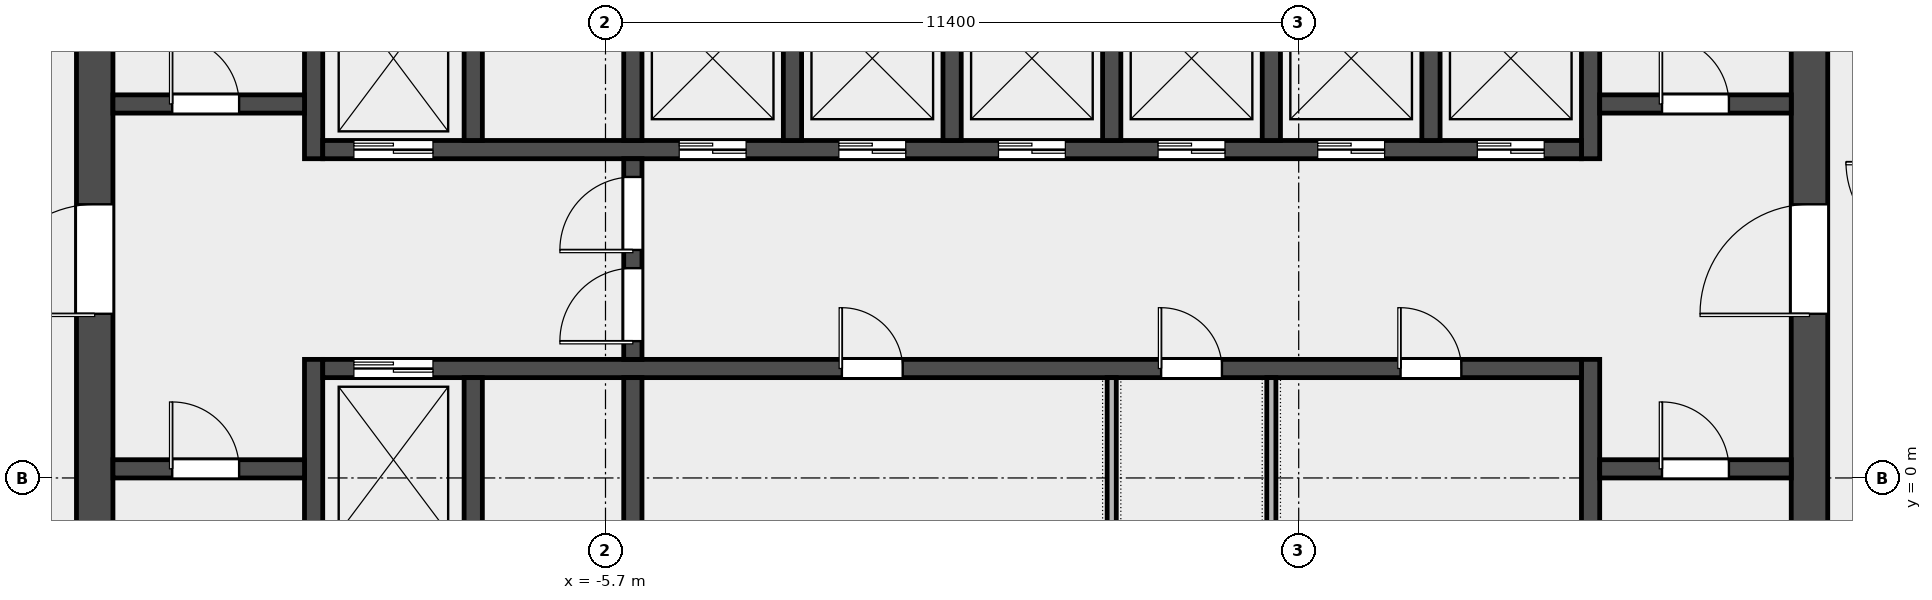
"""IFC4 building model, lengths in metres.
Left out: names, types, materials, properties, quantities, classifications, styles, units other than length and angle.
Written with IfcOpenShell. Run it as: python <this file> out.ifc"""

import sys

from ifc_helpers import new_model, si_unit, direction, frame, frame_2d, origin, place, context, subcontext, project, spatial, rectangle, extrude, element, fill, save


model = new_model("IFC4")
c1 = context("Model", 3, precision=1e-05, world=origin(), true_north=direction((0.0, 1.0)))
c2 = subcontext(c1, "Body", "Model", "MODEL_VIEW")
j1 = project(units=[si_unit("LENGTHUNIT", "METRE"), si_unit("PLANEANGLEUNIT", "RADIAN")], contexts=[c1])
p1 = place(None, origin())
s1 = spatial("IfcSite", under=j1, at=p1, CompositionType="ELEMENT")
p2 = place(p1, origin())
s2 = spatial("IfcBuilding", under=s1, at=p2, CompositionType="ELEMENT")
p3 = place(p2, frame((0.0, 0.0, 291.4)))
s3 = spatial("IfcBuildingStorey", under=s2, at=p3, CompositionType="ELEMENT", Elevation=291.4)
p4 = place(p3, frame((-14.1, -6.6, 0.0), z_axis=(0.0, 0.0, 1.0), x_axis=(0.0, 1.0, 0.0)))
e1 = element("IfcWall", 1, at=p4, inside=s3, PredefinedType="SHEAR", context=c2, shape_type="SweptSolid", body=[
    extrude(rectangle(XDim=19.5, YDim=0.6, at=frame_2d((9.75, 0.0))), origin(), (0.0, 0.0, 1.0), 3.7),
])
p5 = place(p4, frame((9.3, 0.0, 0.0)))
e2 = element("IfcOpeningElement", 2, at=p5, cuts=e1, PredefinedType="OPENING", context=c2, shape_type="SweptSolid", body=[
    extrude(rectangle(XDim=1.8, YDim=2.1, at=frame_2d((0.9, 1.05))), frame((0.0, 0.312, 0.0), z_axis=(0.0, -1.0, 0.0), x_axis=(1.0, 0.0, 0.0)), (0.0, 0.0, 1.0), 0.624),
])
p6 = place(p3, frame((14.1, -6.6, 0.0), z_axis=(0.0, 0.0, 1.0), x_axis=(0.0, 1.0, 0.0)))
e3 = element("IfcWall", 3, at=p6, inside=s3, PredefinedType="SHEAR", context=c2, shape_type="SweptSolid", body=[
    extrude(rectangle(XDim=19.5, YDim=0.6, at=frame_2d((9.75, 0.0))), origin(), (0.0, 0.0, 1.0), 3.7),
])
p7 = place(p6, frame((9.3, 0.0, 0.0)))
e4 = element("IfcOpeningElement", 4, at=p7, cuts=e3, PredefinedType="OPENING", context=c2, shape_type="SweptSolid", body=[
    extrude(rectangle(XDim=1.8, YDim=2.1, at=frame_2d((0.9, 1.05))), frame((0.0, 0.312, 0.0), z_axis=(0.0, -1.0, 0.0), x_axis=(1.0, 0.0, 0.0)), (0.0, 0.0, 1.0), 0.624),
])
p8 = place(p3, frame((-10.5, -6.6, 0.0), z_axis=(0.0, 0.0, 1.0), x_axis=(0.0, 1.0, 0.0)))
e5 = element("IfcWall", 5, at=p8, inside=s3, PredefinedType="SHEAR", context=c2, shape_type="SweptSolid", body=[
    extrude(rectangle(XDim=8.55, YDim=0.3, at=frame_2d((4.275, 0.0))), origin(), (0.0, 0.0, 1.0), 3.7),
])
p9 = place(p3, frame((-10.5, 5.25, 0.0), z_axis=(0.0, 0.0, 1.0), x_axis=(0.0, 1.0, 0.0)))
e6 = element("IfcWall", 6, at=p9, inside=s3, PredefinedType="SHEAR", context=c2, shape_type="SweptSolid", body=[
    extrude(rectangle(XDim=7.65, YDim=0.3, at=frame_2d((3.825, 0.0))), origin(), (0.0, 0.0, 1.0), 3.7),
])
p10 = place(p3, frame((10.5, -6.6, 0.0), z_axis=(0.0, 0.0, 1.0), x_axis=(0.0, 1.0, 0.0)))
e7 = element("IfcWall", 7, at=p10, inside=s3, PredefinedType="SHEAR", context=c2, shape_type="SweptSolid", body=[
    extrude(rectangle(XDim=8.55, YDim=0.3, at=frame_2d((4.275, 0.0))), origin(), (0.0, 0.0, 1.0), 3.7),
])
p11 = place(p3, frame((10.5, 5.25, 0.0), z_axis=(0.0, 0.0, 1.0), x_axis=(0.0, 1.0, 0.0)))
e8 = element("IfcWall", 8, at=p11, inside=s3, PredefinedType="SHEAR", context=c2, shape_type="SweptSolid", body=[
    extrude(rectangle(XDim=7.65, YDim=0.3, at=frame_2d((3.825, 0.0))), origin(), (0.0, 0.0, 1.0), 3.7),
])
p12 = place(p3, frame((-13.8, 0.15, 0.0), z_axis=(0.0, 0.0, 1.0), x_axis=(1.0, 0.0, 0.0)))
e9 = element("IfcWall", 9, at=p12, inside=s3, PredefinedType="SOLIDWALL", context=c2, shape_type="SweptSolid", body=[
    extrude(rectangle(XDim=3.15, YDim=0.3, at=frame_2d((1.575, 0.0))), origin(), (0.0, 0.0, 1.0), 3.7),
])
p13 = place(p12, frame((0.975, 0.0, 0.0)))
e10 = element("IfcOpeningElement", 10, at=p13, cuts=e9, PredefinedType="OPENING", context=c2, shape_type="SweptSolid", body=[
    extrude(rectangle(XDim=1.1, YDim=2.1, at=frame_2d((0.55, 1.05))), frame((0.0, 0.162, 0.0), z_axis=(0.0, -1.0, 0.0), x_axis=(1.0, 0.0, 0.0)), (0.0, 0.0, 1.0), 0.324),
])
p14 = place(p3, frame((-13.8, 6.15, 0.0), z_axis=(0.0, 0.0, 1.0), x_axis=(1.0, 0.0, 0.0)))
e11 = element("IfcWall", 11, at=p14, inside=s3, PredefinedType="SOLIDWALL", context=c2, shape_type="SweptSolid", body=[
    extrude(rectangle(XDim=3.15, YDim=0.3, at=frame_2d((1.575, 0.0))), origin(), (0.0, 0.0, 1.0), 3.7),
])
p15 = place(p14, frame((0.975, 0.0, 0.0)))
e12 = element("IfcOpeningElement", 12, at=p15, cuts=e11, PredefinedType="OPENING", context=c2, shape_type="SweptSolid", body=[
    extrude(rectangle(XDim=1.1, YDim=2.1, at=frame_2d((0.55, 1.05))), frame((0.0, 0.162, 0.0), z_axis=(0.0, -1.0, 0.0), x_axis=(1.0, 0.0, 0.0)), (0.0, 0.0, 1.0), 0.324),
])
p16 = place(p3, frame((10.65, 0.15, 0.0), z_axis=(0.0, 0.0, 1.0), x_axis=(1.0, 0.0, 0.0)))
e13 = element("IfcWall", 13, at=p16, inside=s3, PredefinedType="SOLIDWALL", context=c2, shape_type="SweptSolid", body=[
    extrude(rectangle(XDim=3.15, YDim=0.3, at=frame_2d((1.575, 0.0))), origin(), (0.0, 0.0, 1.0), 3.7),
])
p17 = place(p16, frame((1.025, 0.0, 0.0)))
e14 = element("IfcOpeningElement", 14, at=p17, cuts=e13, PredefinedType="OPENING", context=c2, shape_type="SweptSolid", body=[
    extrude(rectangle(XDim=1.1, YDim=2.1, at=frame_2d((0.55, 1.05))), frame((0.0, 0.162, 0.0), z_axis=(0.0, -1.0, 0.0), x_axis=(1.0, 0.0, 0.0)), (0.0, 0.0, 1.0), 0.324),
])
p18 = place(p3, frame((10.65, 6.15, 0.0), z_axis=(0.0, 0.0, 1.0), x_axis=(1.0, 0.0, 0.0)))
e15 = element("IfcWall", 15, at=p18, inside=s3, PredefinedType="SOLIDWALL", context=c2, shape_type="SweptSolid", body=[
    extrude(rectangle(XDim=3.15, YDim=0.3, at=frame_2d((1.575, 0.0))), origin(), (0.0, 0.0, 1.0), 3.7),
])
p19 = place(p18, frame((1.025, 0.0, 0.0)))
e16 = element("IfcOpeningElement", 16, at=p19, cuts=e15, PredefinedType="OPENING", context=c2, shape_type="SweptSolid", body=[
    extrude(rectangle(XDim=1.1, YDim=2.1, at=frame_2d((0.55, 1.05))), frame((0.0, 0.162, 0.0), z_axis=(0.0, -1.0, 0.0), x_axis=(1.0, 0.0, 0.0)), (0.0, 0.0, 1.0), 0.324),
])
p20 = place(p3, frame((-10.35, 1.8, 0.0), z_axis=(0.0, 0.0, 1.0), x_axis=(1.0, 0.0, 0.0)))
e17 = element("IfcWall", 17, at=p20, inside=s3, PredefinedType="SOLIDWALL", context=c2, shape_type="SweptSolid", body=[
    extrude(rectangle(XDim=20.7, YDim=0.3, at=frame_2d((10.35, 0.0))), origin(), (0.0, 0.0, 1.0), 3.7),
])
p21 = place(p20, frame((0.512, 0.0, 0.0)))
e18 = element("IfcOpeningElement", 18, at=p21, cuts=e17, PredefinedType="OPENING", context=c2, shape_type="SweptSolid", body=[
    extrude(rectangle(XDim=1.3, YDim=2.1, at=frame_2d((0.65, 1.05))), frame((0.0, 0.162, 0.0), z_axis=(0.0, -1.0, 0.0), x_axis=(1.0, 0.0, 0.0)), (0.0, 0.0, 1.0), 0.324),
])
p22 = place(p20, frame((8.538, 0.0, 0.0)))
e19 = element("IfcOpeningElement", 19, at=p22, cuts=e17, PredefinedType="OPENING", context=c2, shape_type="SweptSolid", body=[
    extrude(rectangle(XDim=1.0, YDim=2.1, at=frame_2d((0.5, 1.05))), frame((0.0, 0.162, 0.0), z_axis=(0.0, -1.0, 0.0), x_axis=(1.0, 0.0, 0.0)), (0.0, 0.0, 1.0), 0.324),
])
p23 = place(p20, frame((13.788, 0.0, 0.0)))
e20 = element("IfcOpeningElement", 20, at=p23, cuts=e17, PredefinedType="OPENING", context=c2, shape_type="SweptSolid", body=[
    extrude(rectangle(XDim=1.0, YDim=2.1, at=frame_2d((0.5, 1.05))), frame((0.0, 0.162, 0.0), z_axis=(0.0, -1.0, 0.0), x_axis=(1.0, 0.0, 0.0)), (0.0, 0.0, 1.0), 0.324),
])
p24 = place(p20, frame((17.725, 0.0, 0.0)))
e21 = element("IfcOpeningElement", 21, at=p24, cuts=e17, PredefinedType="OPENING", context=c2, shape_type="SweptSolid", body=[
    extrude(rectangle(XDim=1.0, YDim=2.1, at=frame_2d((0.5, 1.05))), frame((0.0, 0.162, 0.0), z_axis=(0.0, -1.0, 0.0), x_axis=(1.0, 0.0, 0.0)), (0.0, 0.0, 1.0), 0.324),
])
p25 = place(p3, frame((-10.35, 5.4, 0.0), z_axis=(0.0, 0.0, 1.0), x_axis=(1.0, 0.0, 0.0)))
e22 = element("IfcWall", 22, at=p25, inside=s3, PredefinedType="SOLIDWALL", context=c2, shape_type="SweptSolid", body=[
    extrude(rectangle(XDim=20.7, YDim=0.3, at=frame_2d((10.35, 0.0))), origin(), (0.0, 0.0, 1.0), 3.7),
])
p26 = place(p25, frame((0.512, 0.0, 0.0)))
e23 = element("IfcOpeningElement", 23, at=p26, cuts=e22, PredefinedType="OPENING", context=c2, shape_type="SweptSolid", body=[
    extrude(rectangle(XDim=1.3, YDim=2.1, at=frame_2d((0.65, 1.05))), frame((0.0, 0.162, 0.0), z_axis=(0.0, -1.0, 0.0), x_axis=(1.0, 0.0, 0.0)), (0.0, 0.0, 1.0), 0.324),
])
p27 = place(p25, frame((5.863, 0.0, 0.0)))
e24 = element("IfcOpeningElement", 24, at=p27, cuts=e22, PredefinedType="OPENING", context=c2, shape_type="SweptSolid", body=[
    extrude(rectangle(XDim=1.1, YDim=2.1, at=frame_2d((0.55, 1.05))), frame((0.0, 0.162, 0.0), z_axis=(0.0, -1.0, 0.0), x_axis=(1.0, 0.0, 0.0)), (0.0, 0.0, 1.0), 0.324),
])
p28 = place(p25, frame((8.488, 0.0, 0.0)))
e25 = element("IfcOpeningElement", 25, at=p28, cuts=e22, PredefinedType="OPENING", context=c2, shape_type="SweptSolid", body=[
    extrude(rectangle(XDim=1.1, YDim=2.1, at=frame_2d((0.55, 1.05))), frame((0.0, 0.162, 0.0), z_axis=(0.0, -1.0, 0.0), x_axis=(1.0, 0.0, 0.0)), (0.0, 0.0, 1.0), 0.324),
])
p29 = place(p25, frame((11.113, 0.0, 0.0)))
e26 = element("IfcOpeningElement", 26, at=p29, cuts=e22, PredefinedType="OPENING", context=c2, shape_type="SweptSolid", body=[
    extrude(rectangle(XDim=1.1, YDim=2.1, at=frame_2d((0.55, 1.05))), frame((0.0, 0.162, 0.0), z_axis=(0.0, -1.0, 0.0), x_axis=(1.0, 0.0, 0.0)), (0.0, 0.0, 1.0), 0.324),
])
p30 = place(p25, frame((13.738, 0.0, 0.0)))
e27 = element("IfcOpeningElement", 27, at=p30, cuts=e22, PredefinedType="OPENING", context=c2, shape_type="SweptSolid", body=[
    extrude(rectangle(XDim=1.1, YDim=2.1, at=frame_2d((0.55, 1.05))), frame((0.0, 0.162, 0.0), z_axis=(0.0, -1.0, 0.0), x_axis=(1.0, 0.0, 0.0)), (0.0, 0.0, 1.0), 0.324),
])
p31 = place(p25, frame((16.363, 0.0, 0.0)))
e28 = element("IfcOpeningElement", 28, at=p31, cuts=e22, PredefinedType="OPENING", context=c2, shape_type="SweptSolid", body=[
    extrude(rectangle(XDim=1.1, YDim=2.1, at=frame_2d((0.55, 1.05))), frame((0.0, 0.162, 0.0), z_axis=(0.0, -1.0, 0.0), x_axis=(1.0, 0.0, 0.0)), (0.0, 0.0, 1.0), 0.324),
])
p32 = place(p25, frame((18.988, 0.0, 0.0)))
e29 = element("IfcOpeningElement", 29, at=p32, cuts=e22, PredefinedType="OPENING", context=c2, shape_type="SweptSolid", body=[
    extrude(rectangle(XDim=1.1, YDim=2.1, at=frame_2d((0.55, 1.05))), frame((0.0, 0.162, 0.0), z_axis=(0.0, -1.0, 0.0), x_axis=(1.0, 0.0, 0.0)), (0.0, 0.0, 1.0), 0.324),
])
for number, where, z_axis, x_axis in (
    (30, (-7.875, -1.05, 0.0), (0.0, 0.0, 1.0), (0.0, 1.0, 0.0)),
    (31, (-5.25, -1.05, 0.0), (0.0, 0.0, 1.0), (0.0, 1.0, 0.0)),
    (32, (-7.875, 5.55, 0.0), (0.0, 0.0, 1.0), (0.0, 1.0, 0.0)),
    (33, (-5.25, 5.55, 0.0), (0.0, 0.0, 1.0), (0.0, 1.0, 0.0)),
    (34, (-2.625, 5.55, 0.0), (0.0, 0.0, 1.0), (0.0, 1.0, 0.0)),
    (35, (0.0, 5.55, 0.0), (0.0, 0.0, 1.0), (0.0, 1.0, 0.0)),
    (36, (2.625, 5.55, 0.0), (0.0, 0.0, 1.0), (0.0, 1.0, 0.0)),
    (37, (5.25, 5.55, 0.0), (0.0, 0.0, 1.0), (0.0, 1.0, 0.0)),
    (38, (7.875, 5.55, 0.0), (0.0, 0.0, 1.0), (0.0, 1.0, 0.0)),
):
    element("IfcWall", number, at=place(p3, frame(where, z_axis=z_axis, x_axis=x_axis)), inside=s3, PredefinedType="SOLIDWALL", context=c2, shape_type="SweptSolid", body=[
        extrude(rectangle(XDim=2.7, YDim=0.3, at=frame_2d((1.35, 0.0))), origin(), (0.0, 0.0, 1.0), 3.7),
    ])
p33 = place(p3, frame((-5.25, 1.95, 0.0), z_axis=(0.0, 0.0, 1.0), x_axis=(0.0, 1.0, 0.0)))
e39 = element("IfcWall", 39, at=p33, inside=s3, PredefinedType="SOLIDWALL", context=c2, shape_type="SweptSolid", body=[
    extrude(rectangle(XDim=3.3, YDim=0.3, at=frame_2d((1.65, 0.0))), origin(), (0.0, 0.0, 1.0), 3.7),
])
p34 = place(p33, frame((0.3, 0.0, 0.0)))
e40 = element("IfcOpeningElement", 40, at=p34, cuts=e39, PredefinedType="OPENING", context=c2, shape_type="SweptSolid", body=[
    extrude(rectangle(XDim=1.2, YDim=2.1, at=frame_2d((0.6, 1.05))), frame((0.0, 0.162, 0.0), z_axis=(0.0, -1.0, 0.0), x_axis=(1.0, 0.0, 0.0)), (0.0, 0.0, 1.0), 0.324),
])
p35 = place(p33, frame((1.8, 0.0, 0.0)))
e41 = element("IfcOpeningElement", 41, at=p35, cuts=e39, PredefinedType="OPENING", context=c2, shape_type="SweptSolid", body=[
    extrude(rectangle(XDim=1.2, YDim=2.1, at=frame_2d((0.6, 1.05))), frame((0.0, 0.162, 0.0), z_axis=(0.0, -1.0, 0.0), x_axis=(1.0, 0.0, 0.0)), (0.0, 0.0, 1.0), 0.324),
])
for number, where, z_axis, x_axis in (
    (42, (2.625, -1.05, 0.0), (0.0, 0.0, 1.0), (0.0, 1.0, 0.0)),
    (43, (5.25, -1.05, 0.0), (0.0, 0.0, 1.0), (0.0, 1.0, 0.0)),
):
    element("IfcWall", number, at=place(p3, frame(where, z_axis=z_axis, x_axis=x_axis)), inside=s3, PredefinedType="PARTITIONING", context=c2, shape_type="SweptSolid", body=[
        extrude(rectangle(XDim=2.7, YDim=0.15, at=frame_2d((1.35, 0.0))), origin(), (0.0, 0.0, 1.0), 3.7),
    ])
p36 = place(p13, origin())
e44 = element("IfcDoor", 44, at=p36, inside=s3, OperationType="SINGLE_SWING_LEFT", PredefinedType="DOOR", context=c2, shape_type="SweptSolid", body=[
    extrude(rectangle(XDim=1.1, YDim=2.1, at=frame_2d((0.55, 1.05))), frame((0.0, 0.025, 0.0), z_axis=(0.0, -1.0, 0.0), x_axis=(1.0, 0.0, 0.0)), (0.0, 0.0, 1.0), 0.05),
])
fill(e10, e44)
p37 = place(p15, origin())
e45 = element("IfcDoor", 45, at=p37, inside=s3, OperationType="SINGLE_SWING_LEFT", PredefinedType="DOOR", context=c2, shape_type="SweptSolid", body=[
    extrude(rectangle(XDim=1.1, YDim=2.1, at=frame_2d((0.55, 1.05))), frame((0.0, 0.025, 0.0), z_axis=(0.0, -1.0, 0.0), x_axis=(1.0, 0.0, 0.0)), (0.0, 0.0, 1.0), 0.05),
])
fill(e12, e45)
p38 = place(p17, origin())
e46 = element("IfcDoor", 46, at=p38, inside=s3, OperationType="SINGLE_SWING_RIGHT", PredefinedType="DOOR", context=c2, shape_type="SweptSolid", body=[
    extrude(rectangle(XDim=1.1, YDim=2.1, at=frame_2d((0.55, 1.05))), frame((0.0, 0.025, 0.0), z_axis=(0.0, -1.0, 0.0), x_axis=(1.0, 0.0, 0.0)), (0.0, 0.0, 1.0), 0.05),
])
fill(e14, e46)
p39 = place(p19, origin())
e47 = element("IfcDoor", 47, at=p39, inside=s3, OperationType="SINGLE_SWING_RIGHT", PredefinedType="DOOR", context=c2, shape_type="SweptSolid", body=[
    extrude(rectangle(XDim=1.1, YDim=2.1, at=frame_2d((0.55, 1.05))), frame((0.0, 0.025, 0.0), z_axis=(0.0, -1.0, 0.0), x_axis=(1.0, 0.0, 0.0)), (0.0, 0.0, 1.0), 0.05),
])
fill(e16, e47)
p40 = place(p5, origin())
e48 = element("IfcDoor", 48, at=p40, inside=s3, OperationType="DOUBLE_DOOR_SINGLE_SWING", PredefinedType="DOOR", context=c2, shape_type="SweptSolid", body=[
    extrude(rectangle(XDim=1.8, YDim=2.1, at=frame_2d((0.9, 1.05))), frame((0.0, 0.025, 0.0), z_axis=(0.0, -1.0, 0.0), x_axis=(1.0, 0.0, 0.0)), (0.0, 0.0, 1.0), 0.05),
])
fill(e2, e48)
p41 = place(p7, origin())
e49 = element("IfcDoor", 49, at=p41, inside=s3, OperationType="DOUBLE_DOOR_SINGLE_SWING", PredefinedType="DOOR", context=c2, shape_type="SweptSolid", body=[
    extrude(rectangle(XDim=1.8, YDim=2.1, at=frame_2d((0.9, 1.05))), frame((0.0, 0.025, 0.0), z_axis=(0.0, -1.0, 0.0), x_axis=(1.0, 0.0, 0.0)), (0.0, 0.0, 1.0), 0.05),
])
fill(e4, e49)
p42 = place(p34, origin())
e50 = element("IfcDoor", 50, at=p42, inside=s3, OperationType="SINGLE_SWING_LEFT", PredefinedType="DOOR", context=c2, shape_type="SweptSolid", body=[
    extrude(rectangle(XDim=1.2, YDim=2.1, at=frame_2d((0.6, 1.05))), frame((0.0, 0.025, 0.0), z_axis=(0.0, -1.0, 0.0), x_axis=(1.0, 0.0, 0.0)), (0.0, 0.0, 1.0), 0.05),
])
fill(e40, e50)
p43 = place(p35, origin())
e51 = element("IfcDoor", 51, at=p43, inside=s3, OperationType="SINGLE_SWING_RIGHT", PredefinedType="DOOR", context=c2, shape_type="SweptSolid", body=[
    extrude(rectangle(XDim=1.2, YDim=2.1, at=frame_2d((0.6, 1.05))), frame((0.0, 0.025, 0.0), z_axis=(0.0, -1.0, 0.0), x_axis=(1.0, 0.0, 0.0)), (0.0, 0.0, 1.0), 0.05),
])
fill(e41, e51)
p44 = place(p21, origin())
e52 = element("IfcDoor", 52, at=p44, inside=s3, OperationType="DOUBLE_DOOR_SLIDING", PredefinedType="DOOR", context=c2, shape_type="SweptSolid", body=[
    extrude(rectangle(XDim=1.3, YDim=2.1, at=frame_2d((0.65, 1.05))), frame((0.0, 0.025, 0.0), z_axis=(0.0, -1.0, 0.0), x_axis=(1.0, 0.0, 0.0)), (0.0, 0.0, 1.0), 0.05),
])
fill(e18, e52)
p45 = place(p26, origin())
e53 = element("IfcDoor", 53, at=p45, inside=s3, OperationType="DOUBLE_DOOR_SLIDING", PredefinedType="DOOR", context=c2, shape_type="SweptSolid", body=[
    extrude(rectangle(XDim=1.3, YDim=2.1, at=frame_2d((0.65, 1.05))), frame((0.0, 0.025, 0.0), z_axis=(0.0, -1.0, 0.0), x_axis=(1.0, 0.0, 0.0)), (0.0, 0.0, 1.0), 0.05),
])
fill(e23, e53)
p46 = place(p27, origin())
e54 = element("IfcDoor", 54, at=p46, inside=s3, OperationType="DOUBLE_DOOR_SLIDING", PredefinedType="DOOR", context=c2, shape_type="SweptSolid", body=[
    extrude(rectangle(XDim=1.1, YDim=2.1, at=frame_2d((0.55, 1.05))), frame((0.0, 0.025, 0.0), z_axis=(0.0, -1.0, 0.0), x_axis=(1.0, 0.0, 0.0)), (0.0, 0.0, 1.0), 0.05),
])
fill(e24, e54)
p47 = place(p28, origin())
e55 = element("IfcDoor", 55, at=p47, inside=s3, OperationType="DOUBLE_DOOR_SLIDING", PredefinedType="DOOR", context=c2, shape_type="SweptSolid", body=[
    extrude(rectangle(XDim=1.1, YDim=2.1, at=frame_2d((0.55, 1.05))), frame((0.0, 0.025, 0.0), z_axis=(0.0, -1.0, 0.0), x_axis=(1.0, 0.0, 0.0)), (0.0, 0.0, 1.0), 0.05),
])
fill(e25, e55)
p48 = place(p29, origin())
e56 = element("IfcDoor", 56, at=p48, inside=s3, OperationType="DOUBLE_DOOR_SLIDING", PredefinedType="DOOR", context=c2, shape_type="SweptSolid", body=[
    extrude(rectangle(XDim=1.1, YDim=2.1, at=frame_2d((0.55, 1.05))), frame((0.0, 0.025, 0.0), z_axis=(0.0, -1.0, 0.0), x_axis=(1.0, 0.0, 0.0)), (0.0, 0.0, 1.0), 0.05),
])
fill(e26, e56)
p49 = place(p30, origin())
e57 = element("IfcDoor", 57, at=p49, inside=s3, OperationType="DOUBLE_DOOR_SLIDING", PredefinedType="DOOR", context=c2, shape_type="SweptSolid", body=[
    extrude(rectangle(XDim=1.1, YDim=2.1, at=frame_2d((0.55, 1.05))), frame((0.0, 0.025, 0.0), z_axis=(0.0, -1.0, 0.0), x_axis=(1.0, 0.0, 0.0)), (0.0, 0.0, 1.0), 0.05),
])
fill(e27, e57)
p50 = place(p31, origin())
e58 = element("IfcDoor", 58, at=p50, inside=s3, OperationType="DOUBLE_DOOR_SLIDING", PredefinedType="DOOR", context=c2, shape_type="SweptSolid", body=[
    extrude(rectangle(XDim=1.1, YDim=2.1, at=frame_2d((0.55, 1.05))), frame((0.0, 0.025, 0.0), z_axis=(0.0, -1.0, 0.0), x_axis=(1.0, 0.0, 0.0)), (0.0, 0.0, 1.0), 0.05),
])
fill(e28, e58)
p51 = place(p32, origin())
e59 = element("IfcDoor", 59, at=p51, inside=s3, OperationType="DOUBLE_DOOR_SLIDING", PredefinedType="DOOR", context=c2, shape_type="SweptSolid", body=[
    extrude(rectangle(XDim=1.1, YDim=2.1, at=frame_2d((0.55, 1.05))), frame((0.0, 0.025, 0.0), z_axis=(0.0, -1.0, 0.0), x_axis=(1.0, 0.0, 0.0)), (0.0, 0.0, 1.0), 0.05),
])
fill(e29, e59)
p52 = place(p22, origin())
e60 = element("IfcDoor", 60, at=p52, inside=s3, OperationType="SINGLE_SWING_LEFT", PredefinedType="DOOR", context=c2, shape_type="SweptSolid", body=[
    extrude(rectangle(XDim=1.0, YDim=2.1, at=frame_2d((0.5, 1.05))), frame((0.0, 0.025, 0.0), z_axis=(0.0, -1.0, 0.0), x_axis=(1.0, 0.0, 0.0)), (0.0, 0.0, 1.0), 0.05),
])
fill(e19, e60)
p53 = place(p23, origin())
e61 = element("IfcDoor", 61, at=p53, inside=s3, OperationType="SINGLE_SWING_LEFT", PredefinedType="DOOR", context=c2, shape_type="SweptSolid", body=[
    extrude(rectangle(XDim=1.0, YDim=2.1, at=frame_2d((0.5, 1.05))), frame((0.0, 0.025, 0.0), z_axis=(0.0, -1.0, 0.0), x_axis=(1.0, 0.0, 0.0)), (0.0, 0.0, 1.0), 0.05),
])
fill(e20, e61)
p54 = place(p24, origin())
e62 = element("IfcDoor", 62, at=p54, inside=s3, OperationType="SINGLE_SWING_LEFT", PredefinedType="DOOR", context=c2, shape_type="SweptSolid", body=[
    extrude(rectangle(XDim=1.0, YDim=2.1, at=frame_2d((0.5, 1.05))), frame((0.0, 0.025, 0.0), z_axis=(0.0, -1.0, 0.0), x_axis=(1.0, 0.0, 0.0)), (0.0, 0.0, 1.0), 0.05),
])
fill(e21, e62)
save(model, sys.argv[1])
